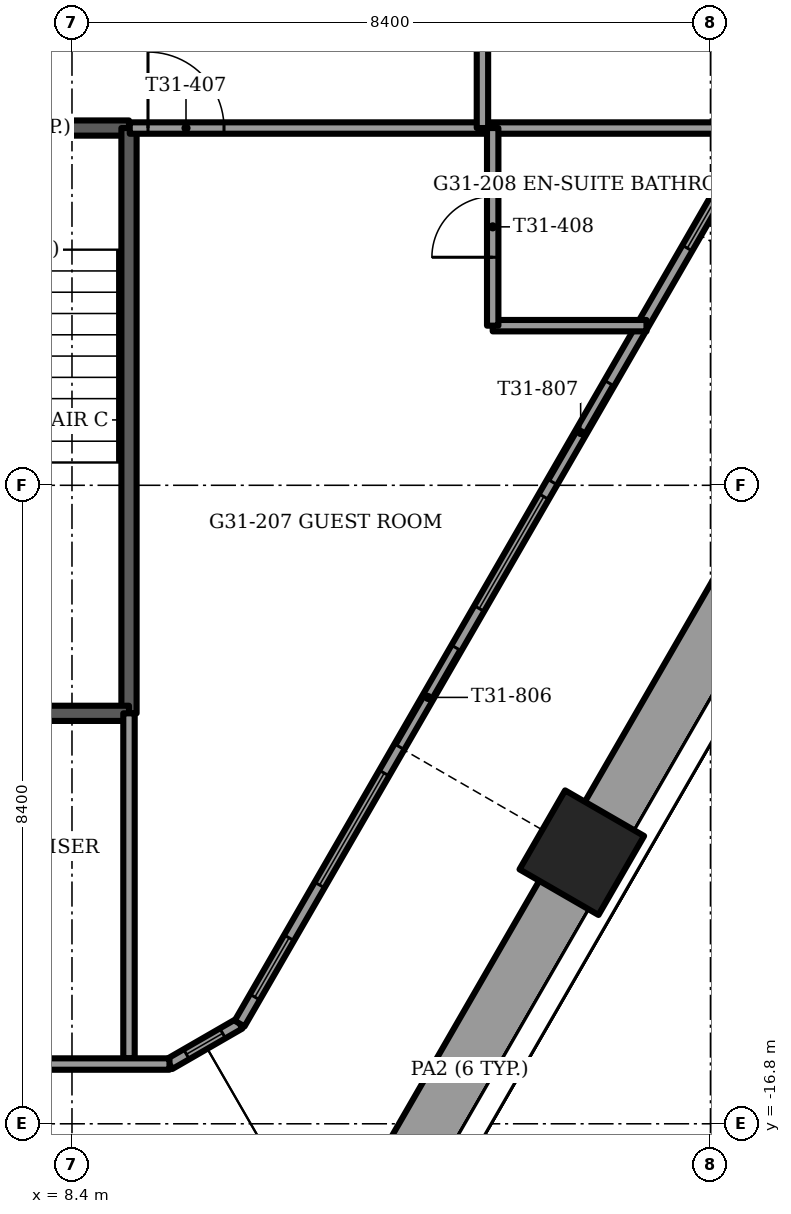
"""IFC4 building model, lengths in metres.
Left out: names, types, materials, properties, quantities, classifications, styles, units other than length and angle.
Written with IfcOpenShell. Run it as: python <this file> out.ifc"""

import sys

from ifc_helpers import new_model, si_unit, direction, frame, frame_2d, origin, origin_2d, place, context, subcontext, project, spatial, rectangle, extrude, element, fill, save


model = new_model("IFC4")
c1 = context("Model", 3, precision=1e-05, world=origin(), true_north=direction((0.0, 1.0)))
c2 = subcontext(c1, "Body", "Model", "MODEL_VIEW")
j1 = project(units=[si_unit("LENGTHUNIT", "METRE"), si_unit("PLANEANGLEUNIT", "RADIAN")], contexts=[c1])
p1 = place(None, origin())
s1 = spatial("IfcSite", under=j1, at=p1, CompositionType="ELEMENT")
p2 = place(p1, origin())
s2 = spatial("IfcBuilding", under=s1, at=p2, CompositionType="ELEMENT")
p3 = place(p2, frame((0.0, 0.0, 127.25)))
s3 = spatial("IfcBuildingStorey", under=s2, at=p3, CompositionType="ELEMENT", Elevation=127.25)
p4 = place(p3, frame((15.107, -13.233, -1.2), z_axis=(0.0, 0.0, 1.0), x_axis=(-0.5, -0.866025403784, 0.0)))
e1 = element("IfcColumn", 1, at=p4, inside=s3, PredefinedType="COLUMN", context=c2, shape_type="SweptSolid", body=[
    extrude(rectangle(XDim=1.2, YDim=1.2, at=origin_2d()), origin(), (0.0, 0.0, 1.0), 3.75),
])
p5 = place(p3, frame((12.312, -18.375, 0.0), z_axis=(0.0, 0.0, 1.0), x_axis=(0.499982573574, 0.866035464703, 0.0)))
e2 = element("IfcWall", 2, at=p5, inside=s3, PredefinedType="PARAPET", context=c2, shape_type="SweptSolid", body=[
    extrude(rectangle(XDim=5.281, YDim=0.9, at=frame_2d((2.641, 0.0))), origin(), (0.0, 0.0, 1.0), 1.1),
])
p6 = place(p3, frame((15.522, -12.815, 0.0), z_axis=(0.0, 0.0, 1.0), x_axis=(0.499999023957, 0.866025967302, 0.0)))
e3 = element("IfcWall", 3, at=p6, inside=s3, PredefinedType="PARAPET", context=c2, shape_type="SweptSolid", body=[
    extrude(rectangle(XDim=6.673, YDim=0.9, at=frame_2d((3.337, 0.0))), origin(), (0.0, 0.0, 1.0), 1.1),
])
p7 = place(p3, frame((-9.683, -16.014, 0.0), z_axis=(0.0, 0.0, 1.0), x_axis=(1.0, 0.0, 0.0)))
e4 = element("IfcWall", 4, at=p7, inside=s3, PredefinedType="SOLIDWALL", context=c2, shape_type="SweptSolid", body=[
    extrude(rectangle(XDim=19.365, YDim=0.15, at=frame_2d((9.683, 0.0))), origin(), (0.0, 0.0, 1.0), 3.45),
])
p8 = place(p7, frame((1.583, 0.0, 0.15)))
e5 = element("IfcOpeningElement", 5, at=p8, cuts=e4, PredefinedType="OPENING", context=c2, shape_type="SweptSolid", body=[
    extrude(rectangle(XDim=1.7, YDim=2.85, at=frame_2d((0.85, 1.425))), frame((0.0, 0.075, 0.0), z_axis=(0.0, -1.0, 0.0), x_axis=(1.0, 0.0, 0.0)), (0.0, 0.0, 1.0), 0.15),
])
p9 = place(p7, frame((5.833, 0.0, 0.15)))
e6 = element("IfcOpeningElement", 6, at=p9, cuts=e4, PredefinedType="OPENING", context=c2, shape_type="SweptSolid", body=[
    extrude(rectangle(XDim=0.9, YDim=2.85, at=frame_2d((0.45, 1.425))), frame((0.0, 0.075, 0.0), z_axis=(0.0, -1.0, 0.0), x_axis=(1.0, 0.0, 0.0)), (0.0, 0.0, 1.0), 0.15),
])
p10 = place(p7, frame((7.283, 0.0, 0.0)))
e7 = element("IfcOpeningElement", 7, at=p10, cuts=e4, PredefinedType="OPENING", context=c2, shape_type="SweptSolid", body=[
    extrude(rectangle(XDim=1.5, YDim=2.4, at=frame_2d((0.75, 1.2))), frame((0.0, 0.075, 0.0), z_axis=(0.0, -1.0, 0.0), x_axis=(1.0, 0.0, 0.0)), (0.0, 0.0, 1.0), 0.15),
])
p11 = place(p7, frame((10.033, 0.0, 0.15)))
e8 = element("IfcOpeningElement", 8, at=p11, cuts=e4, PredefinedType="OPENING", context=c2, shape_type="SweptSolid", body=[
    extrude(rectangle(XDim=1.7, YDim=2.85, at=frame_2d((0.85, 1.425))), frame((0.0, 0.075, 0.0), z_axis=(0.0, -1.0, 0.0), x_axis=(1.0, 0.0, 0.0)), (0.0, 0.0, 1.0), 0.15),
])
p12 = place(p7, frame((12.083, 0.0, 0.0)))
e9 = element("IfcOpeningElement", 9, at=p12, cuts=e4, PredefinedType="OPENING", context=c2, shape_type="SweptSolid", body=[
    extrude(rectangle(XDim=1.5, YDim=2.4, at=frame_2d((0.75, 1.2))), frame((0.0, 0.075, 0.0), z_axis=(0.0, -1.0, 0.0), x_axis=(1.0, 0.0, 0.0)), (0.0, 0.0, 1.0), 0.15),
])
p13 = place(p7, frame((15.833, 0.0, 0.15)))
e10 = element("IfcOpeningElement", 10, at=p13, cuts=e4, PredefinedType="OPENING", context=c2, shape_type="SweptSolid", body=[
    extrude(rectangle(XDim=1.7, YDim=2.85, at=frame_2d((0.85, 1.425))), frame((0.0, 0.075, 0.0), z_axis=(0.0, -1.0, 0.0), x_axis=(1.0, 0.0, 0.0)), (0.0, 0.0, 1.0), 0.15),
])
p14 = place(p3, frame((10.605, -15.481, 0.0), z_axis=(0.0, 0.0, 1.0), x_axis=(0.500010582961, 0.866019293623, 0.0)))
e11 = element("IfcWall", 11, at=p14, inside=s3, PredefinedType="SOLIDWALL", context=c2, shape_type="SweptSolid", body=[
    extrude(rectangle(XDim=16.21, YDim=0.15, at=frame_2d((8.105, 0.0))), origin(), (0.0, 0.0, 1.0), 3.45),
])
p15 = place(p14, frame((2.105, 0.0, 0.15)))
e12 = element("IfcOpeningElement", 12, at=p15, cuts=e11, PredefinedType="OPENING", context=c2, shape_type="SweptSolid", body=[
    extrude(rectangle(XDim=1.7, YDim=2.85, at=frame_2d((0.85, 1.425))), frame((0.0, 0.075, 0.0), z_axis=(0.0, -1.0, 0.0), x_axis=(1.0, 0.0, 0.0)), (0.0, 0.0, 1.0), 0.15),
])
p16 = place(p14, frame((4.205, 0.0, 0.0)))
e13 = element("IfcOpeningElement", 13, at=p16, cuts=e11, PredefinedType="OPENING", context=c2, shape_type="SweptSolid", body=[
    extrude(rectangle(XDim=1.5, YDim=2.4, at=frame_2d((0.75, 1.2))), frame((0.0, 0.075, 0.0), z_axis=(0.0, -1.0, 0.0), x_axis=(1.0, 0.0, 0.0)), (0.0, 0.0, 1.0), 0.15),
])
p17 = place(p14, frame((6.305, 0.0, 0.15)))
e14 = element("IfcOpeningElement", 14, at=p17, cuts=e11, PredefinedType="OPENING", context=c2, shape_type="SweptSolid", body=[
    extrude(rectangle(XDim=1.7, YDim=2.85, at=frame_2d((0.85, 1.425))), frame((0.0, 0.075, 0.0), z_axis=(0.0, -1.0, 0.0), x_axis=(1.0, 0.0, 0.0)), (0.0, 0.0, 1.0), 0.15),
])
p18 = place(p14, frame((8.228, 0.0, 0.0)))
e15 = element("IfcOpeningElement", 15, at=p18, cuts=e11, PredefinedType="OPENING", context=c2, shape_type="SweptSolid", body=[
    extrude(rectangle(XDim=1.5, YDim=2.4, at=frame_2d((0.75, 1.2))), frame((0.0, 0.075, 0.0), z_axis=(0.0, -1.0, 0.0), x_axis=(1.0, 0.0, 0.0)), (0.0, 0.0, 1.0), 0.15),
])
p19 = place(p14, frame((11.78, 0.0, 0.15)))
e16 = element("IfcOpeningElement", 16, at=p19, cuts=e11, PredefinedType="OPENING", context=c2, shape_type="SweptSolid", body=[
    extrude(rectangle(XDim=1.5, YDim=2.85, at=frame_2d((0.75, 1.425))), frame((0.0, 0.075, 0.0), z_axis=(0.0, -1.0, 0.0), x_axis=(1.0, 0.0, 0.0)), (0.0, 0.0, 1.0), 0.15),
])
p20 = place(p14, frame((0.402, 0.0, 0.15)))
e17 = element("IfcOpeningElement", 17, at=p20, cuts=e11, PredefinedType="OPENING", context=c2, shape_type="SweptSolid", body=[
    extrude(rectangle(XDim=0.9, YDim=2.73, at=frame_2d((0.45, 1.365))), frame((0.0, 0.075, 0.0), z_axis=(0.0, -1.0, 0.0), x_axis=(1.0, 0.0, 0.0)), (0.0, 0.0, 1.0), 0.15),
])
p21 = place(p14, frame((14.907, 0.0, 0.15)))
e18 = element("IfcOpeningElement", 18, at=p21, cuts=e11, PredefinedType="OPENING", context=c2, shape_type="SweptSolid", body=[
    extrude(rectangle(XDim=0.9, YDim=2.73, at=frame_2d((0.45, 1.365))), frame((0.0, 0.075, 0.0), z_axis=(0.0, -1.0, 0.0), x_axis=(1.0, 0.0, 0.0)), (0.0, 0.0, 1.0), 0.15),
])
p22 = place(p3, frame((9.683, -16.014, 0.0), z_axis=(0.0, 0.0, 1.0), x_axis=(0.866048165231, 0.499960573946, 0.0)))
e19 = element("IfcWall", 19, at=p22, inside=s3, PredefinedType="SOLIDWALL", context=c2, shape_type="SweptSolid", body=[
    extrude(rectangle(XDim=1.065, YDim=0.15, at=frame_2d((0.532, 0.0))), origin(), (0.0, 0.0, 1.0), 3.45),
])
p23 = place(p22, frame((0.258, 0.0, 0.15)))
e20 = element("IfcOpeningElement", 20, at=p23, cuts=e19, PredefinedType="OPENING", context=c2, shape_type="SweptSolid", body=[
    extrude(rectangle(XDim=0.55, YDim=2.85, at=frame_2d((0.275, 1.425))), frame((0.0, 0.075, 0.0), z_axis=(0.0, -1.0, 0.0), x_axis=(1.0, 0.0, 0.0)), (0.0, 0.0, 1.0), 0.15),
])
p24 = place(p3, frame((5.8, -3.7, -0.3), z_axis=(0.0, 0.0, 1.0), x_axis=(1.0, 0.0, 0.0)))
e21 = element("IfcWall", 21, at=p24, inside=s3, PredefinedType="SOLIDWALL", context=c2, shape_type="SweptSolid", body=[
    extrude(rectangle(XDim=3.35, YDim=0.2, at=frame_2d((1.675, 0.0))), origin(), (0.0, 0.0, 1.0), 3.75),
])
p25 = place(p24, frame((1.125, 0.0, 0.0)))
e22 = element("IfcOpeningElement", 22, at=p25, cuts=e21, PredefinedType="OPENING", context=c2, shape_type="SweptSolid", body=[
    extrude(rectangle(XDim=1.1, YDim=2.1, at=frame_2d((0.55, 1.05))), frame((0.0, 0.1, 0.0), z_axis=(0.0, -1.0, 0.0), x_axis=(1.0, 0.0, 0.0)), (0.0, 0.0, 1.0), 0.2),
])
p26 = place(p3, frame((9.15, -3.7, -0.3), z_axis=(0.0, 0.0, 1.0), x_axis=(0.0, -1.0, 0.0)))
e23 = element("IfcWall", 23, at=p26, inside=s3, PredefinedType="SOLIDWALL", context=c2, shape_type="SweptSolid", body=[
    extrude(rectangle(XDim=7.7, YDim=0.2, at=frame_2d((3.85, 0.0))), origin(), (0.0, 0.0, 1.0), 3.75),
])
p27 = place(p3, frame((5.8, -11.4, -0.3), z_axis=(0.0, 0.0, 1.0), x_axis=(1.0, 0.0, 0.0)))
e24 = element("IfcWall", 24, at=p27, inside=s3, PredefinedType="SOLIDWALL", context=c2, shape_type="SweptSolid", body=[
    extrude(rectangle(XDim=3.35, YDim=0.2, at=frame_2d((1.675, 0.0))), origin(), (0.0, 0.0, 1.0), 3.75),
])
p28 = place(p3, frame((9.15, -11.4, 0.0), z_axis=(0.0, 0.0, 1.0), x_axis=(0.0, -1.0, 0.0)))
e25 = element("IfcWall", 25, at=p28, inside=s3, PredefinedType="PARTITIONING", context=c2, shape_type="SweptSolid", body=[
    extrude(rectangle(XDim=4.539, YDim=0.15, at=frame_2d((2.27, 0.0))), origin(), (0.0, 0.0, 1.0), 3.45),
])
p29 = place(p3, frame((13.935, -6.3, 0.0), z_axis=(0.0, 0.0, 1.0), x_axis=(1.0, 0.0, 0.0)))
e26 = element("IfcWall", 26, at=p29, inside=s3, PredefinedType="PARTITIONING", context=c2, shape_type="SweptSolid", body=[
    extrude(rectangle(XDim=2.023, YDim=0.15, at=frame_2d((1.011, 0.0))), origin(), (0.0, 0.0, 1.0), 3.45),
])
p30 = place(p3, frame((9.16, -3.7, 0.0), z_axis=(0.0, 0.0, 1.0), x_axis=(1.0, 0.0, 0.0)))
e27 = element("IfcWall", 27, at=p30, inside=s3, PredefinedType="PARTITIONING", context=c2, shape_type="SweptSolid", body=[
    extrude(rectangle(XDim=8.299, YDim=0.15, at=frame_2d((4.149, 0.0))), origin(), (0.0, 0.0, 1.0), 3.45),
])
p31 = place(p30, frame((0.24, 0.0, 0.0)))
e28 = element("IfcOpeningElement", 28, at=p31, cuts=e27, PredefinedType="OPENING", context=c2, shape_type="SweptSolid", body=[
    extrude(rectangle(XDim=1.0, YDim=2.1, at=frame_2d((0.5, 1.05))), frame((0.0, 0.075, 0.0), z_axis=(0.0, -1.0, 0.0), x_axis=(1.0, 0.0, 0.0)), (0.0, 0.0, 1.0), 0.15),
])
p32 = place(p3, frame((13.935, -6.3, 0.0), z_axis=(0.0, 0.0, 1.0), x_axis=(0.0, 1.0, 0.0)))
e29 = element("IfcWall", 29, at=p32, inside=s3, PredefinedType="PARTITIONING", context=c2, shape_type="SweptSolid", body=[
    extrude(rectangle(XDim=2.6, YDim=0.15, at=frame_2d((1.3, 0.0))), origin(), (0.0, 0.0, 1.0), 3.45),
])
p33 = place(p32, frame((0.9, 0.0, 0.0)))
e30 = element("IfcOpeningElement", 30, at=p33, cuts=e29, PredefinedType="OPENING", context=c2, shape_type="SweptSolid", body=[
    extrude(rectangle(XDim=0.8, YDim=2.1, at=frame_2d((0.4, 1.05))), frame((0.0, 0.075, 0.0), z_axis=(0.0, -1.0, 0.0), x_axis=(1.0, 0.0, 0.0)), (0.0, 0.0, 1.0), 0.15),
])
p34 = place(p3, frame((13.8, -3.7, 0.0), z_axis=(0.0, 0.0, 1.0), x_axis=(0.0, 1.0, 0.0)))
e31 = element("IfcWall", 31, at=p34, inside=s3, PredefinedType="PARTITIONING", context=c2, shape_type="SweptSolid", body=[
    extrude(rectangle(XDim=11.916, YDim=0.15, at=frame_2d((5.958, 0.0))), origin(), (0.0, 0.0, 1.0), 3.45),
])
p35 = place(p34, frame((4.104, 0.0, 0.0)))
e32 = element("IfcOpeningElement", 32, at=p35, cuts=e31, PredefinedType="OPENING", context=c2, shape_type="SweptSolid", body=[
    extrude(rectangle(XDim=1.0, YDim=2.1, at=frame_2d((0.5, 1.05))), frame((0.0, 0.075, 0.0), z_axis=(0.0, -1.0, 0.0), x_axis=(1.0, 0.0, 0.0)), (0.0, 0.0, 1.0), 0.15),
])
p36 = place(p34, frame((9.538, 0.0, 0.0)))
e33 = element("IfcOpeningElement", 33, at=p36, cuts=e31, PredefinedType="OPENING", context=c2, shape_type="SweptSolid", body=[
    extrude(rectangle(XDim=1.0, YDim=2.1, at=frame_2d((0.5, 1.05))), frame((0.0, 0.075, 0.0), z_axis=(0.0, -1.0, 0.0), x_axis=(1.0, 0.0, 0.0)), (0.0, 0.0, 1.0), 0.15),
])
p37 = place(p15, origin())
e34 = element("IfcWindow", 34, at=p37, inside=s3, PartitioningType="SINGLE_PANEL", PredefinedType="WINDOW", context=c2, shape_type="SweptSolid", body=[
    extrude(rectangle(XDim=1.7, YDim=2.85, at=frame_2d((0.85, 1.425))), frame((0.0, 0.03, 0.0), z_axis=(0.0, -1.0, 0.0), x_axis=(1.0, 0.0, 0.0)), (0.0, 0.0, 1.0), 0.06),
])
fill(e12, e34)
p38 = place(p16, origin())
e35 = element("IfcDoor", 35, at=p38, inside=s3, OperationType="SLIDING_TO_LEFT", PredefinedType="DOOR", context=c2, shape_type="SweptSolid", body=[
    extrude(rectangle(XDim=1.5, YDim=2.4, at=frame_2d((0.75, 1.2))), frame((0.0, 0.025, 0.0), z_axis=(0.0, -1.0, 0.0), x_axis=(1.0, 0.0, 0.0)), (0.0, 0.0, 1.0), 0.05),
])
fill(e13, e35)
p39 = place(p17, origin())
e36 = element("IfcWindow", 36, at=p39, inside=s3, PartitioningType="SINGLE_PANEL", PredefinedType="WINDOW", context=c2, shape_type="SweptSolid", body=[
    extrude(rectangle(XDim=1.7, YDim=2.85, at=frame_2d((0.85, 1.425))), frame((0.0, 0.03, 0.0), z_axis=(0.0, -1.0, 0.0), x_axis=(1.0, 0.0, 0.0)), (0.0, 0.0, 1.0), 0.06),
])
fill(e14, e36)
p40 = place(p18, origin())
e37 = element("IfcDoor", 37, at=p40, inside=s3, OperationType="SLIDING_TO_RIGHT", PredefinedType="DOOR", context=c2, shape_type="SweptSolid", body=[
    extrude(rectangle(XDim=1.5, YDim=2.4, at=frame_2d((0.75, 1.2))), frame((0.0, 0.025, 0.0), z_axis=(0.0, -1.0, 0.0), x_axis=(1.0, 0.0, 0.0)), (0.0, 0.0, 1.0), 0.05),
])
fill(e15, e37)
p41 = place(p19, origin())
e38 = element("IfcWindow", 38, at=p41, inside=s3, PartitioningType="SINGLE_PANEL", PredefinedType="WINDOW", context=c2, shape_type="SweptSolid", body=[
    extrude(rectangle(XDim=1.5, YDim=2.85, at=frame_2d((0.75, 1.425))), frame((0.0, 0.03, 0.0), z_axis=(0.0, -1.0, 0.0), x_axis=(1.0, 0.0, 0.0)), (0.0, 0.0, 1.0), 0.06),
])
fill(e16, e38)
p42 = place(p20, origin())
e39 = element("IfcWindow", 39, at=p42, inside=s3, PartitioningType="SINGLE_PANEL", PredefinedType="WINDOW", context=c2, shape_type="SweptSolid", body=[
    extrude(rectangle(XDim=0.9, YDim=2.73, at=frame_2d((0.45, 1.365))), frame((0.0, 0.03, 0.0), z_axis=(0.0, -1.0, 0.0), x_axis=(1.0, 0.0, 0.0)), (0.0, 0.0, 1.0), 0.06),
])
fill(e17, e39)
p43 = place(p23, origin())
e40 = element("IfcWindow", 40, at=p43, inside=s3, PartitioningType="SINGLE_PANEL", PredefinedType="WINDOW", context=c2, shape_type="SweptSolid", body=[
    extrude(rectangle(XDim=0.55, YDim=2.85, at=frame_2d((0.275, 1.425))), frame((0.0, 0.03, 0.0), z_axis=(0.0, -1.0, 0.0), x_axis=(1.0, 0.0, 0.0)), (0.0, 0.0, 1.0), 0.06),
])
fill(e20, e40)
p44 = place(p31, origin())
e41 = element("IfcDoor", 41, at=p44, inside=s3, OperationType="SINGLE_SWING_LEFT", PredefinedType="DOOR", context=c2, shape_type="SweptSolid", body=[
    extrude(rectangle(XDim=1.0, YDim=2.1, at=frame_2d((0.5, 1.05))), frame((0.0, 0.025, 0.0), z_axis=(0.0, -1.0, 0.0), x_axis=(1.0, 0.0, 0.0)), (0.0, 0.0, 1.0), 0.05),
])
fill(e28, e41)
p45 = place(p33, origin())
e42 = element("IfcDoor", 42, at=p45, inside=s3, OperationType="SINGLE_SWING_RIGHT", PredefinedType="DOOR", context=c2, shape_type="SweptSolid", body=[
    extrude(rectangle(XDim=0.8, YDim=2.1, at=frame_2d((0.4, 1.05))), frame((0.0, 0.025, 0.0), z_axis=(0.0, -1.0, 0.0), x_axis=(1.0, 0.0, 0.0)), (0.0, 0.0, 1.0), 0.05),
])
fill(e30, e42)
save(model, sys.argv[1])
